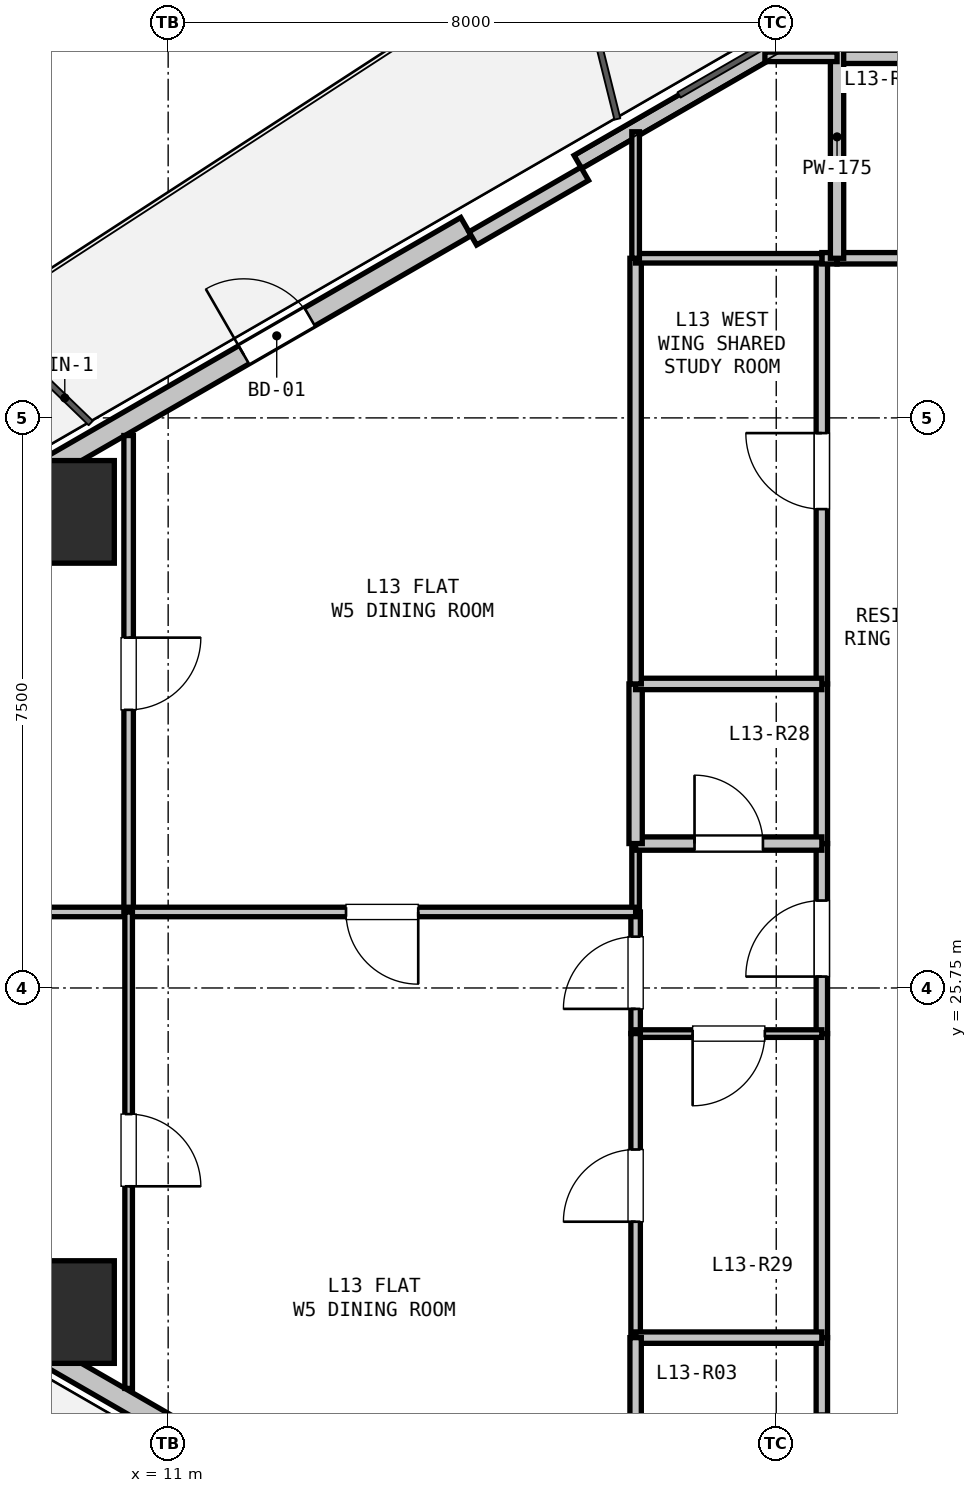
"""IFC4 building model, lengths in metres.
Left out: names, types, materials, properties, quantities, classifications, styles, units other than length and angle.
Written with IfcOpenShell. Run it as: python <this file> out.ifc"""

import sys

from ifc_helpers import new_model, si_unit, direction, frame, frame_2d, origin, origin_2d, place, context, subcontext, project, spatial, rectangle, hollow_rectangle, extrude, element, fill, save


model = new_model("IFC4")
c1 = context("Model", 3, precision=1e-05, world=origin(), true_north=direction((0.0, 1.0)))
c2 = subcontext(c1, "Body", "Model", "MODEL_VIEW")
j1 = project(units=[si_unit("LENGTHUNIT", "METRE"), si_unit("PLANEANGLEUNIT", "RADIAN")], contexts=[c1])
p1 = place(None, origin())
s1 = spatial("IfcSite", under=j1, at=p1, CompositionType="ELEMENT")
p2 = place(p1, origin())
s2 = spatial("IfcBuilding", under=s1, at=p2, CompositionType="ELEMENT")
p3 = place(p2, frame((0.0, 0.0, 48.9)))
s3 = spatial("IfcBuildingStorey", under=s2, at=p3, CompositionType="ELEMENT", Elevation=48.9)
for number, where, z_axis, x_axis in (
    (1, (9.617, 32.014, 0.0), (0.0, 0.0, 1.0), (1.0, 0.0, 0.0)),
    (2, (9.617, 21.486, 0.0), (0.0, 0.0, 1.0), (1.0, 0.0, 0.0)),
):
    element("IfcColumn", number, at=place(p3, frame(where, z_axis=z_axis, x_axis=x_axis)), inside=s3, PredefinedType="COLUMN", context=c2, shape_type="SweptSolid", body=[
        extrude(hollow_rectangle(XDim=1.35, YDim=1.35, WallThickness=0.036, at=origin_2d()), origin(), (0.0, 0.0, 1.0), 3.3),
    ])
p4 = place(p3, frame((3.943, 29.431, 0.0), z_axis=(0.0, 0.0, 1.0), x_axis=(0.866027105532, 0.499997052475, 0.0)))
e3 = element("IfcWall", 3, at=p4, inside=s3, PredefinedType="SOLIDWALL", context=c2, shape_type="SweptSolid", body=[
    extrude(rectangle(XDim=12.673, YDim=0.275, at=frame_2d((6.336, 0.0))), origin(), (0.0, 0.0, 1.0), 2.66),
])
p5 = place(p4, frame((9.298, 0.0, 0.0)))
e4 = element("IfcOpeningElement", 4, at=p5, cuts=e3, PredefinedType="OPENING", context=c2, shape_type="SweptSolid", body=[
    extrude(rectangle(XDim=1.0, YDim=2.1, at=frame_2d((0.5, 1.05))), frame((0.0, 0.147, 0.0), z_axis=(0.0, -1.0, 0.0), x_axis=(1.0, 0.0, 0.0)), (0.0, 0.0, 1.0), 0.295),
])
p6 = place(p3, frame((16.39, 36.617, 0.0), z_axis=(0.0, 0.0, 1.0), x_axis=(0.866027351828, 0.499996625875, 0.0)))
e5 = element("IfcWall", 5, at=p6, inside=s3, PredefinedType="PARAPET", context=c2, shape_type="SweptSolid", body=[
    extrude(rectangle(XDim=11.973, YDim=0.2, at=frame_2d((5.987, 0.0))), origin(), (0.0, 0.0, 1.0), 0.2),
])
p7 = place(p3, frame((15.008, 35.611, 0.0), z_axis=(0.0, 0.0, 1.0), x_axis=(0.86605165483, 0.499954529098, 0.0)))
e6 = element("IfcWall", 6, at=p7, inside=s3, PredefinedType="PARAPET", context=c2, shape_type="SweptSolid", body=[
    extrude(rectangle(XDim=1.7, YDim=0.2, at=frame_2d((0.85, 0.0))), origin(), (0.0, 0.0, 1.0), 2.66),
])
p8 = place(p3, frame((14.918, 17.733, 0.0), z_axis=(0.0, 0.0, 1.0), x_axis=(-0.866027105532, 0.499997052475, 0.0)))
e7 = element("IfcWall", 7, at=p8, inside=s3, PredefinedType="SOLIDWALL", context=c2, shape_type="SweptSolid", body=[
    extrude(rectangle(XDim=12.673, YDim=0.275, at=frame_2d((6.336, 0.0))), origin(), (0.0, 0.0, 1.0), 2.66),
])
p9 = place(p8, frame((8.402, 0.0, 0.9)))
e8 = element("IfcOpeningElement", 8, at=p9, cuts=e7, PredefinedType="OPENING", context=c2, shape_type="SweptSolid", body=[
    extrude(rectangle(XDim=1.2, YDim=1.4, at=frame_2d((0.6, 0.7))), frame((0.0, 0.147, 0.0), z_axis=(0.0, -1.0, 0.0), x_axis=(1.0, 0.0, 0.0)), (0.0, 0.0, 1.0), 0.295),
])
p10 = place(p3, frame((19.6, 18.15, 0.0), z_axis=(0.0, 0.0, 1.0), x_axis=(0.0, 1.0, 0.0)))
e9 = element("IfcWall", 9, at=p10, inside=s3, PredefinedType="PARTITIONING", context=c2, shape_type="SweptSolid", body=[
    extrude(rectangle(XDim=3.0, YDim=0.15, at=frame_2d((1.5, 0.0))), origin(), (0.0, 0.0, 1.0), 2.338),
])
p11 = place(p10, frame((1.0, 0.0, 0.0)))
e10 = element("IfcOpeningElement", 10, at=p11, cuts=e9, PredefinedType="OPENING", context=c2, shape_type="SweptSolid", body=[
    extrude(rectangle(XDim=1.0, YDim=2.15, at=frame_2d((0.5, 1.075))), frame((0.0, 0.085, 0.0), z_axis=(0.0, -1.0, 0.0), x_axis=(1.0, 0.0, 0.0)), (0.0, 0.0, 1.0), 0.17),
])
p12 = place(p3, frame((19.6, 21.15, 0.0), z_axis=(0.0, 0.0, 1.0), x_axis=(0.0, 1.0, 0.0)))
e11 = element("IfcWall", 11, at=p12, inside=s3, PredefinedType="PARTITIONING", context=c2, shape_type="SweptSolid", body=[
    extrude(rectangle(XDim=4.0, YDim=0.15, at=frame_2d((2.0, 0.0))), origin(), (0.0, 0.0, 1.0), 3.04),
])
p13 = place(p3, frame((19.6, 25.15, 0.0), z_axis=(0.0, 0.0, 1.0), x_axis=(0.0, 1.0, 0.0)))
e12 = element("IfcWall", 12, at=p13, inside=s3, PredefinedType="PARTITIONING", context=c2, shape_type="SweptSolid", body=[
    extrude(rectangle(XDim=2.5, YDim=0.15, at=frame_2d((1.25, 0.0))), origin(), (0.0, 0.0, 1.0), 3.04),
])
p14 = place(p13, frame((0.75, 0.0, 0.0)))
e13 = element("IfcOpeningElement", 13, at=p14, cuts=e12, PredefinedType="OPENING", context=c2, shape_type="SweptSolid", body=[
    extrude(rectangle(XDim=1.0, YDim=2.15, at=frame_2d((0.5, 1.075))), frame((0.0, 0.085, 0.0), z_axis=(0.0, -1.0, 0.0), x_axis=(1.0, 0.0, 0.0)), (0.0, 0.0, 1.0), 0.17),
])
p15 = place(p3, frame((19.6, 27.65, 0.0), z_axis=(0.0, 0.0, 1.0), x_axis=(0.0, 1.0, 0.0)))
e14 = element("IfcWall", 14, at=p15, inside=s3, PredefinedType="PARTITIONING", context=c2, shape_type="SweptSolid", body=[
    extrude(rectangle(XDim=2.1, YDim=0.15, at=frame_2d((1.05, 0.0))), origin(), (0.0, 0.0, 1.0), 3.04),
])
p16 = place(p3, frame((19.6, 29.75, 0.0), z_axis=(0.0, 0.0, 1.0), x_axis=(0.0, 1.0, 0.0)))
e15 = element("IfcWall", 15, at=p16, inside=s3, PredefinedType="PARTITIONING", context=c2, shape_type="SweptSolid", body=[
    extrude(rectangle(XDim=5.6, YDim=0.15, at=frame_2d((2.8, 0.0))), origin(), (0.0, 0.0, 1.0), 2.338),
])
p17 = place(p16, frame((2.3, 0.0, 0.0)))
e16 = element("IfcOpeningElement", 16, at=p17, cuts=e15, PredefinedType="OPENING", context=c2, shape_type="SweptSolid", body=[
    extrude(rectangle(XDim=1.0, YDim=2.15, at=frame_2d((0.5, 1.075))), frame((0.0, 0.085, 0.0), z_axis=(0.0, -1.0, 0.0), x_axis=(1.0, 0.0, 0.0)), (0.0, 0.0, 1.0), 0.17),
])
p18 = place(p3, frame((19.6, 35.35, 0.0), z_axis=(0.0, 0.0, 1.0), x_axis=(1.0, 0.0, 0.0)))
e17 = element("IfcWall", 17, at=p18, inside=s3, PredefinedType="PARTITIONING", context=c2, shape_type="SweptSolid", body=[
    extrude(rectangle(XDim=0.2, YDim=0.15, at=frame_2d((0.1, 0.0))), origin(), (0.0, 0.0, 1.0), 3.04),
])
p19 = place(p3, frame((19.8, 35.35, 0.0), z_axis=(0.0, 0.0, 1.0), x_axis=(1.0, 0.0, 0.0)))
e18 = element("IfcWall", 18, at=p19, inside=s3, PredefinedType="PARTITIONING", context=c2, shape_type="SweptSolid", body=[
    extrude(rectangle(XDim=2.0, YDim=0.15, at=frame_2d((1.0, 0.0))), origin(), (0.0, 0.0, 1.0), 3.04),
])
p20 = place(p3, frame((17.15, 25.15, 0.0), z_axis=(0.0, 0.0, 1.0), x_axis=(0.0, 1.0, 0.0)))
e19 = element("IfcWall", 19, at=p20, inside=s3, PredefinedType="PARTITIONING", context=c2, shape_type="SweptSolid", body=[
    extrude(rectangle(XDim=1.6, YDim=0.125, at=frame_2d((0.8, 0.0))), origin(), (0.0, 0.0, 1.0), 3.04),
])
p21 = place(p20, frame((0.325, 0.0, 0.0)))
e20 = element("IfcOpeningElement", 20, at=p21, cuts=e19, PredefinedType="OPENING", context=c2, shape_type="SweptSolid", body=[
    extrude(rectangle(XDim=0.95, YDim=2.1, at=frame_2d((0.475, 1.05))), frame((0.0, 0.073, 0.0), z_axis=(0.0, -1.0, 0.0), x_axis=(1.0, 0.0, 0.0)), (0.0, 0.0, 1.0), 0.145),
])
p22 = place(p3, frame((17.15, 26.75, 0.0), z_axis=(0.0, 0.0, 1.0), x_axis=(0.0, 1.0, 0.0)))
e21 = element("IfcWall", 21, at=p22, inside=s3, PredefinedType="PARTITIONING", context=c2, shape_type="SweptSolid", body=[
    extrude(rectangle(XDim=0.9, YDim=0.1, at=frame_2d((0.45, 0.0))), origin(), (0.0, 0.0, 1.0), 3.04),
])
p23 = place(p3, frame((17.15, 27.65, 0.0), z_axis=(0.0, 0.0, 1.0), x_axis=(1.0, 0.0, 0.0)))
e22 = element("IfcWall", 22, at=p23, inside=s3, PredefinedType="PLUMBINGWALL", context=c2, shape_type="SweptSolid", body=[
    extrude(rectangle(XDim=2.45, YDim=0.175, at=frame_2d((1.225, 0.0))), origin(), (0.0, 0.0, 1.0), 3.04),
])
p24 = place(p23, frame((0.775, 0.0, 0.0)))
e23 = element("IfcOpeningElement", 23, at=p24, cuts=e22, PredefinedType="OPENING", context=c2, shape_type="SweptSolid", body=[
    extrude(rectangle(XDim=0.9, YDim=2.1, at=frame_2d((0.45, 1.05))), frame((0.0, 0.097, 0.0), z_axis=(0.0, -1.0, 0.0), x_axis=(1.0, 0.0, 0.0)), (0.0, 0.0, 1.0), 0.195),
])
p25 = place(p3, frame((19.6, 25.15, 0.0), z_axis=(0.0, 0.0, 1.0), x_axis=(-1.0, 0.0, 0.0)))
e24 = element("IfcWall", 24, at=p25, inside=s3, PredefinedType="PARTITIONING", context=c2, shape_type="SweptSolid", body=[
    extrude(rectangle(XDim=2.45, YDim=0.1, at=frame_2d((1.225, 0.0))), origin(), (0.0, 0.0, 1.0), 3.04),
])
p26 = place(p25, frame((0.75, 0.0, 0.0)))
e25 = element("IfcOpeningElement", 25, at=p26, cuts=e24, PredefinedType="OPENING", context=c2, shape_type="SweptSolid", body=[
    extrude(rectangle(XDim=0.95, YDim=2.1, at=frame_2d((0.475, 1.05))), frame((0.0, 0.06, 0.0), z_axis=(0.0, -1.0, 0.0), x_axis=(1.0, 0.0, 0.0)), (0.0, 0.0, 1.0), 0.12),
])
p27 = place(p3, frame((19.8, 38.0, 0.0), z_axis=(0.0, 0.0, 1.0), x_axis=(1.0, 0.0, 0.0)))
e26 = element("IfcWall", 26, at=p27, inside=s3, PredefinedType="PLUMBINGWALL", context=c2, shape_type="SweptSolid", body=[
    extrude(rectangle(XDim=2.0, YDim=0.175, at=frame_2d((1.0, 0.0))), origin(), (0.0, 0.0, 1.0), 2.365),
])
p28 = place(p3, frame((19.8, 35.35, 0.0), z_axis=(0.0, 0.0, 1.0), x_axis=(0.0, 1.0, 0.0)))
e27 = element("IfcWall", 27, at=p28, inside=s3, PredefinedType="PLUMBINGWALL", context=c2, shape_type="SweptSolid", body=[
    extrude(rectangle(XDim=3.194, YDim=0.175, at=frame_2d((1.597, 0.0))), origin(), (0.0, 0.0, 1.0), 2.365),
])
p29 = place(p3, frame((17.15, 27.65, 0.0), z_axis=(0.0, 0.0, 1.0), x_axis=(0.0, 1.0, 0.0)))
e28 = element("IfcWall", 28, at=p29, inside=s3, PredefinedType="PLUMBINGWALL", context=c2, shape_type="SweptSolid", body=[
    extrude(rectangle(XDim=2.1, YDim=0.175, at=frame_2d((1.05, 0.0))), origin(), (0.0, 0.0, 1.0), 3.04),
])
p30 = place(p3, frame((17.15, 29.75, 0.0), z_axis=(0.0, 0.0, 1.0), x_axis=(1.0, 0.0, 0.0)))
e29 = element("IfcWall", 29, at=p30, inside=s3, PredefinedType="PARTITIONING", context=c2, shape_type="SweptSolid", body=[
    extrude(rectangle(XDim=2.45, YDim=0.15, at=frame_2d((1.225, 0.0))), origin(), (0.0, 0.0, 1.0), 3.04),
])
p31 = place(p3, frame((17.15, 21.15, 0.0), z_axis=(0.0, 0.0, 1.0), x_axis=(0.0, 1.0, 0.0)))
e30 = element("IfcWall", 30, at=p31, inside=s3, PredefinedType="PARTITIONING", context=c2, shape_type="SweptSolid", body=[
    extrude(rectangle(XDim=4.0, YDim=0.125, at=frame_2d((2.0, 0.0))), origin(), (0.0, 0.0, 1.0), 2.338),
])
p32 = place(p31, frame((1.525, 0.0, 0.0)))
e31 = element("IfcOpeningElement", 31, at=p32, cuts=e30, PredefinedType="OPENING", context=c2, shape_type="SweptSolid", body=[
    extrude(rectangle(XDim=0.95, YDim=2.1, at=frame_2d((0.475, 1.05))), frame((0.0, 0.073, 0.0), z_axis=(0.0, -1.0, 0.0), x_axis=(1.0, 0.0, 0.0)), (0.0, 0.0, 1.0), 0.145),
])
p33 = place(p3, frame((19.6, 21.15, 0.0), z_axis=(0.0, 0.0, 1.0), x_axis=(-1.0, 0.0, 0.0)))
e32 = element("IfcWall", 32, at=p33, inside=s3, PredefinedType="PARTITIONING", context=c2, shape_type="SweptSolid", body=[
    extrude(rectangle(XDim=2.45, YDim=0.15, at=frame_2d((1.225, 0.0))), origin(), (0.0, 0.0, 1.0), 2.338),
])
p34 = place(p3, frame((17.15, 29.75, 0.0), z_axis=(0.0, 0.0, 1.0), x_axis=(0.0, 1.0, 0.0)))
e33 = element("IfcWall", 33, at=p34, inside=s3, PredefinedType="PARTITIONING", context=c2, shape_type="SweptSolid", body=[
    extrude(rectangle(XDim=5.6, YDim=0.15, at=frame_2d((2.8, 0.0))), origin(), (0.0, 0.0, 1.0), 2.338),
])
p35 = place(p3, frame((17.15, 35.35, 0.0), z_axis=(0.0, 0.0, 1.0), x_axis=(1.0, 0.0, 0.0)))
e34 = element("IfcWall", 34, at=p35, inside=s3, PredefinedType="PARTITIONING", context=c2, shape_type="SweptSolid", body=[
    extrude(rectangle(XDim=2.45, YDim=0.125, at=frame_2d((1.225, 0.0))), origin(), (0.0, 0.0, 1.0), 3.04),
])
p36 = place(p3, frame((17.15, 18.15, 0.0), z_axis=(0.0, 0.0, 1.0), x_axis=(0.0, 1.0, 0.0)))
e35 = element("IfcWall", 35, at=p36, inside=s3, PredefinedType="PARTITIONING", context=c2, shape_type="SweptSolid", body=[
    extrude(rectangle(XDim=3.0, YDim=0.15, at=frame_2d((1.5, 0.0))), origin(), (0.0, 0.0, 1.0), 3.04),
])
p37 = place(p3, frame((19.8, 38.0, 0.0), z_axis=(0.0, 0.0, 1.0), x_axis=(-1.0, 0.0, 0.0)))
e36 = element("IfcWall", 36, at=p37, inside=s3, PredefinedType="PARTITIONING", context=c2, shape_type="SweptSolid", body=[
    extrude(rectangle(XDim=0.949, YDim=0.125, at=frame_2d((0.475, 0.0))), origin(), (0.0, 0.0, 1.0), 2.365),
])
p38 = place(p3, frame((10.48, 26.75, 0.0), z_axis=(0.0, 0.0, 1.0), x_axis=(-1.0, 0.0, 0.0)))
e37 = element("IfcWall", 37, at=p38, inside=s3, PredefinedType="PARTITIONING", context=c2, shape_type="SweptSolid", body=[
    extrude(rectangle(XDim=6.505, YDim=0.125, at=frame_2d((3.253, 0.0))), origin(), (0.0, 0.0, 1.0), 2.65),
])
p39 = place(p38, frame((2.778, 0.0, 0.0)))
e38 = element("IfcOpeningElement", 38, at=p39, cuts=e37, PredefinedType="OPENING", context=c2, shape_type="SweptSolid", body=[
    extrude(rectangle(XDim=0.95, YDim=2.1, at=frame_2d((0.475, 1.05))), frame((0.0, 0.073, 0.0), z_axis=(0.0, -1.0, 0.0), x_axis=(1.0, 0.0, 0.0)), (0.0, 0.0, 1.0), 0.145),
])
p40 = place(p3, frame((10.48, 33.018, 0.0), z_axis=(0.0, 0.0, 1.0), x_axis=(0.0, -1.0, 0.0)))
e39 = element("IfcWall", 39, at=p40, inside=s3, PredefinedType="PARTITIONING", context=c2, shape_type="SweptSolid", body=[
    extrude(rectangle(XDim=6.268, YDim=0.125, at=frame_2d((3.134, 0.0))), origin(), (0.0, 0.0, 1.0), 2.338),
])
p41 = place(p40, frame((2.659, 0.0, 0.0)))
e40 = element("IfcOpeningElement", 40, at=p41, cuts=e39, PredefinedType="OPENING", context=c2, shape_type="SweptSolid", body=[
    extrude(rectangle(XDim=0.95, YDim=2.1, at=frame_2d((0.475, 1.05))), frame((0.0, 0.073, 0.0), z_axis=(0.0, -1.0, 0.0), x_axis=(1.0, 0.0, 0.0)), (0.0, 0.0, 1.0), 0.145),
])
p42 = place(p3, frame((17.15, 37.014, 0.0), z_axis=(0.0, 0.0, 1.0), x_axis=(0.0, -1.0, 0.0)))
e41 = element("IfcWall", 41, at=p42, inside=s3, PredefinedType="PARTITIONING", context=c2, shape_type="SweptSolid", body=[
    extrude(rectangle(XDim=1.664, YDim=0.1, at=frame_2d((0.832, 0.0))), origin(), (0.0, 0.0, 1.0), 2.365),
])
p43 = place(p3, frame((17.15, 26.75, 0.0), z_axis=(0.0, 0.0, 1.0), x_axis=(-1.0, 0.0, 0.0)))
e42 = element("IfcWall", 42, at=p43, inside=s3, PredefinedType="PARTITIONING", context=c2, shape_type="SweptSolid", body=[
    extrude(rectangle(XDim=6.67, YDim=0.125, at=frame_2d((3.335, 0.0))), origin(), (0.0, 0.0, 1.0), 3.04),
])
p44 = place(p43, frame((2.86, 0.0, 0.0)))
e43 = element("IfcOpeningElement", 43, at=p44, cuts=e42, PredefinedType="OPENING", context=c2, shape_type="SweptSolid", body=[
    extrude(rectangle(XDim=0.95, YDim=2.1, at=frame_2d((0.475, 1.05))), frame((0.0, 0.073, 0.0), z_axis=(0.0, -1.0, 0.0), x_axis=(1.0, 0.0, 0.0)), (0.0, 0.0, 1.0), 0.145),
])
p45 = place(p3, frame((10.48, 26.75, 0.0), z_axis=(0.0, 0.0, 1.0), x_axis=(0.0, -1.0, 0.0)))
e44 = element("IfcWall", 44, at=p45, inside=s3, PredefinedType="PARTITIONING", context=c2, shape_type="SweptSolid", body=[
    extrude(rectangle(XDim=6.268, YDim=0.1, at=frame_2d((3.134, 0.0))), origin(), (0.0, 0.0, 1.0), 2.338),
])
p46 = place(p45, frame((2.659, 0.0, 0.0)))
e45 = element("IfcOpeningElement", 45, at=p46, cuts=e44, PredefinedType="OPENING", context=c2, shape_type="SweptSolid", body=[
    extrude(rectangle(XDim=0.95, YDim=2.1, at=frame_2d((0.475, 1.05))), frame((0.0, 0.06, 0.0), z_axis=(0.0, -1.0, 0.0), x_axis=(1.0, 0.0, 0.0)), (0.0, 0.0, 1.0), 0.12),
])
p47 = place(p5, origin())
e46 = element("IfcDoor", 46, at=p47, inside=s3, OperationType="SINGLE_SWING_LEFT", PredefinedType="DOOR", context=c2, shape_type="SweptSolid", body=[
    extrude(rectangle(XDim=1.0, YDim=2.1, at=frame_2d((0.5, 1.05))), frame((0.0, 0.025, 0.0), z_axis=(0.0, -1.0, 0.0), x_axis=(1.0, 0.0, 0.0)), (0.0, 0.0, 1.0), 0.05),
])
fill(e4, e46)
p48 = place(p14, origin())
e47 = element("IfcDoor", 47, at=p48, inside=s3, OperationType="SINGLE_SWING_LEFT", PredefinedType="DOOR", context=c2, shape_type="SweptSolid", body=[
    extrude(rectangle(XDim=1.0, YDim=2.15, at=frame_2d((0.5, 1.075))), frame((0.0, 0.025, 0.0), z_axis=(0.0, -1.0, 0.0), x_axis=(1.0, 0.0, 0.0)), (0.0, 0.0, 1.0), 0.05),
])
fill(e13, e47)
p49 = place(p17, origin())
e48 = element("IfcDoor", 48, at=p49, inside=s3, OperationType="SINGLE_SWING_RIGHT", PredefinedType="DOOR", context=c2, shape_type="SweptSolid", body=[
    extrude(rectangle(XDim=1.0, YDim=2.15, at=frame_2d((0.5, 1.075))), frame((0.0, 0.025, 0.0), z_axis=(0.0, -1.0, 0.0), x_axis=(1.0, 0.0, 0.0)), (0.0, 0.0, 1.0), 0.05),
])
fill(e16, e48)
p50 = place(p24, origin())
e49 = element("IfcDoor", 49, at=p50, inside=s3, OperationType="SINGLE_SWING_LEFT", PredefinedType="DOOR", context=c2, shape_type="SweptSolid", body=[
    extrude(rectangle(XDim=0.9, YDim=2.1, at=frame_2d((0.45, 1.05))), frame((0.0, 0.025, 0.0), z_axis=(0.0, -1.0, 0.0), x_axis=(1.0, 0.0, 0.0)), (0.0, 0.0, 1.0), 0.05),
])
fill(e23, e49)
p51 = place(p26, origin())
e50 = element("IfcDoor", 50, at=p51, inside=s3, OperationType="SINGLE_SWING_RIGHT", PredefinedType="DOOR", context=c2, shape_type="SweptSolid", body=[
    extrude(rectangle(XDim=0.95, YDim=2.1, at=frame_2d((0.475, 1.05))), frame((0.0, 0.025, 0.0), z_axis=(0.0, -1.0, 0.0), x_axis=(1.0, 0.0, 0.0)), (0.0, 0.0, 1.0), 0.05),
])
fill(e25, e50)
p52 = place(p21, origin())
e51 = element("IfcDoor", 51, at=p52, inside=s3, OperationType="SINGLE_SWING_LEFT", PredefinedType="DOOR", context=c2, shape_type="SweptSolid", body=[
    extrude(rectangle(XDim=0.95, YDim=2.1, at=frame_2d((0.475, 1.05))), frame((0.0, 0.025, 0.0), z_axis=(0.0, -1.0, 0.0), x_axis=(1.0, 0.0, 0.0)), (0.0, 0.0, 1.0), 0.05),
])
fill(e20, e51)
p53 = place(p32, origin())
e52 = element("IfcDoor", 52, at=p53, inside=s3, OperationType="SINGLE_SWING_LEFT", PredefinedType="DOOR", context=c2, shape_type="SweptSolid", body=[
    extrude(rectangle(XDim=0.95, YDim=2.1, at=frame_2d((0.475, 1.05))), frame((0.0, 0.025, 0.0), z_axis=(0.0, -1.0, 0.0), x_axis=(1.0, 0.0, 0.0)), (0.0, 0.0, 1.0), 0.05),
])
fill(e31, e52)
p54 = place(p41, origin())
e53 = element("IfcDoor", 53, at=p54, inside=s3, OperationType="SINGLE_SWING_LEFT", PredefinedType="DOOR", context=c2, shape_type="SweptSolid", body=[
    extrude(rectangle(XDim=0.95, YDim=2.1, at=frame_2d((0.475, 1.05))), frame((0.0, 0.025, 0.0), z_axis=(0.0, -1.0, 0.0), x_axis=(1.0, 0.0, 0.0)), (0.0, 0.0, 1.0), 0.05),
])
fill(e40, e53)
p55 = place(p44, origin())
e54 = element("IfcDoor", 54, at=p55, inside=s3, OperationType="SINGLE_SWING_LEFT", PredefinedType="DOOR", context=c2, shape_type="SweptSolid", body=[
    extrude(rectangle(XDim=0.95, YDim=2.1, at=frame_2d((0.475, 1.05))), frame((0.0, 0.025, 0.0), z_axis=(0.0, -1.0, 0.0), x_axis=(1.0, 0.0, 0.0)), (0.0, 0.0, 1.0), 0.05),
])
fill(e43, e54)
p56 = place(p46, origin())
e55 = element("IfcDoor", 55, at=p56, inside=s3, OperationType="SINGLE_SWING_RIGHT", PredefinedType="DOOR", context=c2, shape_type="SweptSolid", body=[
    extrude(rectangle(XDim=0.95, YDim=2.1, at=frame_2d((0.475, 1.05))), frame((0.0, 0.025, 0.0), z_axis=(0.0, -1.0, 0.0), x_axis=(1.0, 0.0, 0.0)), (0.0, 0.0, 1.0), 0.05),
])
fill(e45, e55)
save(model, sys.argv[1])
